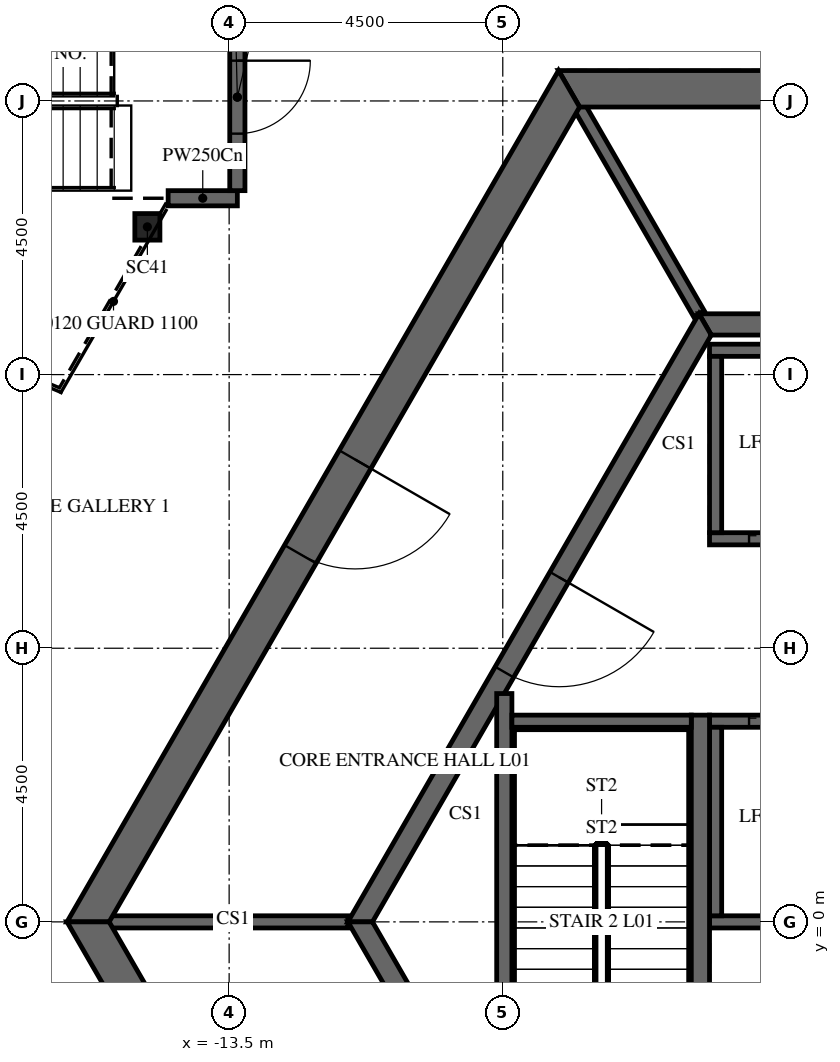
"""IFC4 building model, lengths in metres.
Left out: names, types, materials, properties, quantities, classifications, styles, units other than length and angle.
Written with IfcOpenShell. Run it as: python <this file> out.ifc"""

import sys

from ifc_helpers import new_model, si_unit, direction, frame, frame_2d, origin, origin_2d, place, context, subcontext, project, spatial, polyline, rectangle, i_section, outline, extrude, element, fill, save


model = new_model("IFC4")
c1 = context("Model", 3, precision=1e-05, world=origin(), true_north=direction((0.0, 1.0)))
c2 = subcontext(c1, "Body", "Model", "MODEL_VIEW")
j1 = project(units=[si_unit("LENGTHUNIT", "METRE"), si_unit("PLANEANGLEUNIT", "RADIAN")], contexts=[c1])
p1 = place(None, origin())
s1 = spatial("IfcSite", under=j1, at=p1, CompositionType="ELEMENT")
p2 = place(p1, origin())
s2 = spatial("IfcBuilding", under=s1, at=p2, CompositionType="ELEMENT")
p3 = place(p2, frame((0.0, 0.0, 9.0)))
s3 = spatial("IfcBuildingStorey", under=s2, at=p3, CompositionType="ELEMENT", Elevation=9.0)
p4 = place(p3, frame((-14.845, 11.43, -0.25), z_axis=(0.0, 0.0, 1.0), x_axis=(1.0, 0.0, 0.0)))
e1 = element("IfcColumn", 1, at=p4, inside=s3, PredefinedType="COLUMN", context=c2, shape_type="SweptSolid", body=[
    extrude(i_section(OverallWidth=0.412, OverallDepth=0.437, WebThickness=0.036, FlangeThickness=0.058, FilletRadius=0.015, at=origin_2d()), origin(), (0.0, 0.0, 1.0), 6.0),
])
p5 = place(p3, frame((-7.91, 13.7, -0.25), z_axis=(0.0, 0.0, 1.0), x_axis=(-0.499999880136, -0.866025472988, 0.0)))
e2 = element("IfcWall", 2, at=p5, inside=s3, PredefinedType="SHEAR", context=c2, shape_type="SweptSolid", body=[
    extrude(outline(polyline([(-0.173, -0.3), (15.993, -0.3), (15.646, 0.3), (0.173, 0.3), (-0.173, -0.3)])), origin(), (0.0, 0.0, 1.0), 6.0),
])
p6 = place(p5, frame((7.039, 0.0, 0.25)))
e3 = element("IfcOpeningElement", 3, at=p6, cuts=e2, PredefinedType="OPENING", context=c2, shape_type="SweptSolid", body=[
    extrude(rectangle(XDim=1.8, YDim=2.4, at=frame_2d((0.9, 1.2))), frame((0.0, 0.31, 0.0), z_axis=(0.0, -1.0, 0.0), x_axis=(1.0, 0.0, 0.0)), (0.0, 0.0, 1.0), 0.62),
])
p7 = place(p3, frame((-15.819, 0.0, -0.25), z_axis=(0.0, 0.0, 1.0), x_axis=(0.499999880136, -0.866025472988, 0.0)))
e4 = element("IfcWall", 4, at=p7, inside=s3, PredefinedType="SHEAR", context=c2, shape_type="SweptSolid", body=[
    extrude(outline(polyline([(-0.173, -0.3), (15.993, -0.3), (15.646, 0.3), (0.173, 0.3), (-0.173, -0.3)])), origin(), (0.0, 0.0, 1.0), 6.0),
])
p8 = place(p7, frame((6.981, 0.0, 0.25)))
e5 = element("IfcOpeningElement", 5, at=p8, cuts=e4, PredefinedType="OPENING", context=c2, shape_type="SweptSolid", body=[
    extrude(rectangle(XDim=1.8, YDim=2.4, at=frame_2d((0.9, 1.2))), frame((0.0, 0.31, 0.0), z_axis=(0.0, -1.0, 0.0), x_axis=(1.0, 0.0, 0.0)), (0.0, 0.0, 1.0), 0.62),
])
p9 = place(p3, frame((7.91, 13.7, -0.25), z_axis=(0.0, 0.0, 1.0), x_axis=(-1.0, 0.0, 0.0)))
e6 = element("IfcWall", 6, at=p9, inside=s3, PredefinedType="SHEAR", context=c2, shape_type="SweptSolid", body=[
    extrude(outline(polyline([(-0.173, -0.3), (15.993, -0.3), (15.646, 0.3), (0.173, 0.3), (-0.173, -0.3)])), origin(), (0.0, 0.0, 1.0), 6.0),
])
p10 = place(p9, frame((7.31, 0.0, 0.25)))
e7 = element("IfcOpeningElement", 7, at=p10, cuts=e6, PredefinedType="OPENING", context=c2, shape_type="SweptSolid", body=[
    extrude(rectangle(XDim=1.2, YDim=2.4, at=frame_2d((0.6, 1.2))), frame((0.0, 0.31, 0.0), z_axis=(0.0, -1.0, 0.0), x_axis=(1.0, 0.0, 0.0)), (0.0, 0.0, 1.0), 0.62),
])
p11 = place(p3, frame((-5.673, 9.825, -0.25), z_axis=(0.0, 0.0, 1.0), x_axis=(-0.499995046907, -0.866028263435, 0.0)))
e8 = element("IfcWall", 8, at=p11, inside=s3, PredefinedType="SHEAR", context=c2, shape_type="SweptSolid", body=[
    extrude(outline(polyline([(-0.101, -0.175), (11.446, -0.175), (11.244, 0.175), (0.101, 0.175), (-0.101, -0.175)])), origin(), (0.0, 0.0, 1.0), 6.0),
])
p12 = place(p11, frame((4.801, 0.0, 0.25)))
e9 = element("IfcOpeningElement", 9, at=p12, cuts=e8, PredefinedType="OPENING", context=c2, shape_type="SweptSolid", body=[
    extrude(rectangle(XDim=1.8, YDim=2.4, at=frame_2d((0.9, 1.2))), frame((0.0, 0.185, 0.0), z_axis=(0.0, -1.0, 0.0), x_axis=(1.0, 0.0, 0.0)), (0.0, 0.0, 1.0), 0.37),
])
p13 = place(p3, frame((-11.345, 0.0, -0.25), z_axis=(0.0, 0.0, 1.0), x_axis=(0.499995046907, -0.866028263435, 0.0)))
e10 = element("IfcWall", 10, at=p13, inside=s3, PredefinedType="SHEAR", context=c2, shape_type="SweptSolid", body=[
    extrude(outline(polyline([(-0.101, -0.175), (11.446, -0.175), (11.244, 0.175), (0.101, 0.175), (-0.101, -0.175)])), origin(), (0.0, 0.0, 1.0), 6.0),
])
p14 = place(p13, frame((4.744, 0.0, 0.25)))
e11 = element("IfcOpeningElement", 11, at=p14, cuts=e10, PredefinedType="OPENING", context=c2, shape_type="SweptSolid", body=[
    extrude(rectangle(XDim=1.8, YDim=2.4, at=frame_2d((0.9, 1.2))), frame((0.0, 0.185, 0.0), z_axis=(0.0, -1.0, 0.0), x_axis=(1.0, 0.0, 0.0)), (0.0, 0.0, 1.0), 0.37),
])
p15 = place(p3, frame((5.673, 9.825, -0.25), z_axis=(0.0, 0.0, 1.0), x_axis=(-1.0, 0.0, 0.0)))
e12 = element("IfcWall", 12, at=p15, inside=s3, PredefinedType="SHEAR", context=c2, shape_type="SweptSolid", body=[
    extrude(outline(polyline([(-0.101, -0.175), (11.446, -0.175), (11.244, 0.175), (0.101, 0.175), (-0.101, -0.175)])), origin(), (0.0, 0.0, 1.0), 6.0),
])
p16 = place(p3, frame((-5.6, 6.3, -0.25), z_axis=(0.0, 0.0, 1.0), x_axis=(1.0, 0.0, 0.0)))
e13 = element("IfcWall", 13, at=p16, inside=s3, PredefinedType="SHEAR", context=c2, shape_type="SweptSolid", body=[
    extrude(rectangle(XDim=11.2, YDim=0.2, at=frame_2d((5.6, 0.0))), origin(), (0.0, 0.0, 1.0), 6.0),
])
p17 = place(p16, frame((0.65, 0.0, 0.25)))
e14 = element("IfcOpeningElement", 14, at=p17, cuts=e13, PredefinedType="OPENING", context=c2, shape_type="SweptSolid", body=[
    extrude(rectangle(XDim=1.1, YDim=2.1, at=frame_2d((0.55, 1.05))), frame((0.0, 0.11, 0.0), z_axis=(0.0, -1.0, 0.0), x_axis=(1.0, 0.0, 0.0)), (0.0, 0.0, 1.0), 0.22),
])
p18 = place(p16, frame((2.85, 0.0, 0.25)))
e15 = element("IfcOpeningElement", 15, at=p18, cuts=e13, PredefinedType="OPENING", context=c2, shape_type="SweptSolid", body=[
    extrude(rectangle(XDim=1.1, YDim=2.1, at=frame_2d((0.55, 1.05))), frame((0.0, 0.11, 0.0), z_axis=(0.0, -1.0, 0.0), x_axis=(1.0, 0.0, 0.0)), (0.0, 0.0, 1.0), 0.22),
])
p19 = place(p16, frame((5.05, 0.0, 0.25)))
e16 = element("IfcOpeningElement", 16, at=p19, cuts=e13, PredefinedType="OPENING", context=c2, shape_type="SweptSolid", body=[
    extrude(rectangle(XDim=1.1, YDim=2.1, at=frame_2d((0.55, 1.05))), frame((0.0, 0.11, 0.0), z_axis=(0.0, -1.0, 0.0), x_axis=(1.0, 0.0, 0.0)), (0.0, 0.0, 1.0), 0.22),
])
p20 = place(p16, frame((7.25, 0.0, 0.25)))
e17 = element("IfcOpeningElement", 17, at=p20, cuts=e13, PredefinedType="OPENING", context=c2, shape_type="SweptSolid", body=[
    extrude(rectangle(XDim=1.1, YDim=2.1, at=frame_2d((0.55, 1.05))), frame((0.0, 0.11, 0.0), z_axis=(0.0, -1.0, 0.0), x_axis=(1.0, 0.0, 0.0)), (0.0, 0.0, 1.0), 0.22),
])
p21 = place(p16, frame((9.45, 0.0, 0.25)))
e18 = element("IfcOpeningElement", 18, at=p21, cuts=e13, PredefinedType="OPENING", context=c2, shape_type="SweptSolid", body=[
    extrude(rectangle(XDim=1.1, YDim=2.1, at=frame_2d((0.55, 1.05))), frame((0.0, 0.11, 0.0), z_axis=(0.0, -1.0, 0.0), x_axis=(1.0, 0.0, 0.0)), (0.0, 0.0, 1.0), 0.22),
])
p22 = place(p3, frame((-5.6, 9.4, -0.25), z_axis=(0.0, 0.0, 1.0), x_axis=(1.0, 0.0, 0.0)))
e19 = element("IfcWall", 19, at=p22, inside=s3, PredefinedType="SHEAR", context=c2, shape_type="SweptSolid", body=[
    extrude(rectangle(XDim=11.2, YDim=0.2, at=frame_2d((5.6, 0.0))), origin(), (0.0, 0.0, 1.0), 6.0),
])
p23 = place(p3, frame((-5.5, 6.4, -0.25), z_axis=(0.0, 0.0, 1.0), x_axis=(0.0, 1.0, 0.0)))
e20 = element("IfcWall", 20, at=p23, inside=s3, PredefinedType="SHEAR", context=c2, shape_type="SweptSolid", body=[
    extrude(rectangle(XDim=2.9, YDim=0.2, at=frame_2d((1.45, 0.0))), origin(), (0.0, 0.0, 1.0), 6.0),
])
p24 = place(p3, frame((-5.6, 3.3, -0.25), z_axis=(0.0, 0.0, 1.0), x_axis=(1.0, 0.0, 0.0)))
e21 = element("IfcWall", 21, at=p24, inside=s3, PredefinedType="SHEAR", context=c2, shape_type="SweptSolid", body=[
    extrude(rectangle(XDim=11.2, YDim=0.2, at=frame_2d((5.6, 0.0))), origin(), (0.0, 0.0, 1.0), 6.0),
])
p25 = place(p24, frame((0.65, 0.0, 0.25)))
e22 = element("IfcOpeningElement", 22, at=p25, cuts=e21, PredefinedType="OPENING", context=c2, shape_type="SweptSolid", body=[
    extrude(rectangle(XDim=1.1, YDim=2.1, at=frame_2d((0.55, 1.05))), frame((0.0, 0.11, 0.0), z_axis=(0.0, -1.0, 0.0), x_axis=(1.0, 0.0, 0.0)), (0.0, 0.0, 1.0), 0.22),
])
p26 = place(p24, frame((2.85, 0.0, 0.25)))
e23 = element("IfcOpeningElement", 23, at=p26, cuts=e21, PredefinedType="OPENING", context=c2, shape_type="SweptSolid", body=[
    extrude(rectangle(XDim=1.1, YDim=2.1, at=frame_2d((0.55, 1.05))), frame((0.0, 0.11, 0.0), z_axis=(0.0, -1.0, 0.0), x_axis=(1.0, 0.0, 0.0)), (0.0, 0.0, 1.0), 0.22),
])
p27 = place(p24, frame((5.05, 0.0, 0.25)))
e24 = element("IfcOpeningElement", 24, at=p27, cuts=e21, PredefinedType="OPENING", context=c2, shape_type="SweptSolid", body=[
    extrude(rectangle(XDim=1.1, YDim=2.1, at=frame_2d((0.55, 1.05))), frame((0.0, 0.11, 0.0), z_axis=(0.0, -1.0, 0.0), x_axis=(1.0, 0.0, 0.0)), (0.0, 0.0, 1.0), 0.22),
])
p28 = place(p24, frame((7.25, 0.0, 0.25)))
e25 = element("IfcOpeningElement", 25, at=p28, cuts=e21, PredefinedType="OPENING", context=c2, shape_type="SweptSolid", body=[
    extrude(rectangle(XDim=1.1, YDim=2.1, at=frame_2d((0.55, 1.05))), frame((0.0, 0.11, 0.0), z_axis=(0.0, -1.0, 0.0), x_axis=(1.0, 0.0, 0.0)), (0.0, 0.0, 1.0), 0.22),
])
p29 = place(p24, frame((9.45, 0.0, 0.25)))
e26 = element("IfcOpeningElement", 26, at=p29, cuts=e21, PredefinedType="OPENING", context=c2, shape_type="SweptSolid", body=[
    extrude(rectangle(XDim=1.1, YDim=2.1, at=frame_2d((0.55, 1.05))), frame((0.0, 0.11, 0.0), z_axis=(0.0, -1.0, 0.0), x_axis=(1.0, 0.0, 0.0)), (0.0, 0.0, 1.0), 0.22),
])
p30 = place(p3, frame((-5.6, 0.0, -0.25), z_axis=(0.0, 0.0, 1.0), x_axis=(1.0, 0.0, 0.0)))
e27 = element("IfcWall", 27, at=p30, inside=s3, PredefinedType="SHEAR", context=c2, shape_type="SweptSolid", body=[
    extrude(rectangle(XDim=11.2, YDim=0.2, at=frame_2d((5.6, 0.0))), origin(), (0.0, 0.0, 1.0), 6.0),
])
p31 = place(p3, frame((-5.5, 0.1, -0.25), z_axis=(0.0, 0.0, 1.0), x_axis=(0.0, 1.0, 0.0)))
e28 = element("IfcWall", 28, at=p31, inside=s3, PredefinedType="SHEAR", context=c2, shape_type="SweptSolid", body=[
    extrude(rectangle(XDim=3.1, YDim=0.2, at=frame_2d((1.55, 0.0))), origin(), (0.0, 0.0, 1.0), 6.0),
])
p32 = place(p3, frame((-5.773, 10.0, -0.25), z_axis=(0.0, 0.0, 1.0), x_axis=(-0.500038251005, 0.86600331843, 0.0)))
e29 = element("IfcWall", 29, at=p32, inside=s3, PredefinedType="SHEAR", context=c2, shape_type="SweptSolid", body=[
    extrude(rectangle(XDim=3.926, YDim=0.2, at=frame_2d((1.963, 0.0))), origin(), (0.0, 0.0, 1.0), 6.0),
])
p33 = place(p3, frame((-11.547, 0.0, -0.25), z_axis=(0.0, 0.0, 1.0), x_axis=(-1.0, 0.0, 0.0)))
e30 = element("IfcWall", 30, at=p33, inside=s3, PredefinedType="SHEAR", context=c2, shape_type="SweptSolid", body=[
    extrude(rectangle(XDim=3.926, YDim=0.2, at=frame_2d((1.963, 0.0))), origin(), (0.0, 0.0, 1.0), 6.0),
])
p34 = place(p3, frame((-5.75, -3.4, -0.25), z_axis=(0.0, 0.0, 1.0), x_axis=(0.0, 1.0, 0.0)))
e31 = element("IfcWall", 31, at=p34, inside=s3, PredefinedType="SHEAR", context=c2, shape_type="SweptSolid", body=[
    extrude(rectangle(XDim=6.8, YDim=0.3, at=frame_2d((3.4, 0.0))), origin(), (0.0, 0.0, 1.0), 6.0),
])
p35 = place(p3, frame((-8.975, -3.755, -0.25), z_axis=(0.0, 0.0, 1.0), x_axis=(0.0, 1.0, 0.0)))
e32 = element("IfcWall", 32, at=p35, inside=s3, PredefinedType="SHEAR", context=c2, shape_type="SweptSolid", body=[
    extrude(rectangle(XDim=7.51, YDim=0.25, at=frame_2d((3.755, 0.0))), origin(), (0.0, 0.0, 1.0), 6.0),
])
p36 = place(p3, frame((-8.85, 3.3, -0.25), z_axis=(0.0, 0.0, 1.0), x_axis=(1.0, 0.0, 0.0)))
e33 = element("IfcWall", 33, at=p36, inside=s3, PredefinedType="SHEAR", context=c2, shape_type="SweptSolid", body=[
    extrude(rectangle(XDim=2.95, YDim=0.2, at=frame_2d((1.475, 0.0))), origin(), (0.0, 0.0, 1.0), 6.0),
])
p37 = place(p3, frame((-13.365, 11.9, 0.0), z_axis=(0.0, 0.0, 1.0), x_axis=(-1.0, 0.0, 0.0)))
e34 = element("IfcWall", 34, at=p37, inside=s3, PredefinedType="PARTITIONING", context=c2, shape_type="SweptSolid", body=[
    extrude(rectangle(XDim=1.138, YDim=0.25, at=frame_2d((0.569, 0.0))), origin(), (0.0, 0.0, 1.0), 5.297),
])
p38 = place(p3, frame((-13.365, 15.1, 0.0), z_axis=(0.0, 0.0, 1.0), x_axis=(0.0, -1.0, 0.0)))
e35 = element("IfcWall", 35, at=p38, inside=s3, PredefinedType="PARTITIONING", context=c2, shape_type="SweptSolid", body=[
    extrude(rectangle(XDim=3.075, YDim=0.25, at=frame_2d((1.538, 0.0))), origin(), (0.0, 0.0, 1.0), 4.988),
])
p39 = place(p38, frame((0.938, 0.0, 0.0)))
e36 = element("IfcOpeningElement", 36, at=p39, cuts=e35, PredefinedType="OPENING", context=c2, shape_type="SweptSolid", body=[
    extrude(rectangle(XDim=1.2, YDim=2.1, at=frame_2d((0.6, 1.05))), frame((0.0, 0.135, 0.0), z_axis=(0.0, -1.0, 0.0), x_axis=(1.0, 0.0, 0.0)), (0.0, 0.0, 1.0), 0.27),
])
p40 = place(p6, origin())
e37 = element("IfcDoor", 37, at=p40, inside=s3, OperationType="DOUBLE_DOOR_SINGLE_SWING", PredefinedType="DOOR", context=c2, shape_type="SweptSolid", body=[
    extrude(rectangle(XDim=1.8, YDim=2.4, at=frame_2d((0.9, 1.2))), frame((0.0, 0.025, 0.0), z_axis=(0.0, -1.0, 0.0), x_axis=(1.0, 0.0, 0.0)), (0.0, 0.0, 1.0), 0.05),
])
fill(e3, e37)
p41 = place(p12, origin())
e38 = element("IfcDoor", 38, at=p41, inside=s3, OperationType="DOUBLE_DOOR_SINGLE_SWING", PredefinedType="DOOR", context=c2, shape_type="SweptSolid", body=[
    extrude(rectangle(XDim=1.8, YDim=2.4, at=frame_2d((0.9, 1.2))), frame((0.0, 0.025, 0.0), z_axis=(0.0, -1.0, 0.0), x_axis=(1.0, 0.0, 0.0)), (0.0, 0.0, 1.0), 0.05),
])
fill(e9, e38)
p42 = place(p17, origin())
e39 = element("IfcDoor", 39, at=p42, inside=s3, OperationType="SLIDING_TO_LEFT", PredefinedType="DOOR", context=c2, shape_type="SweptSolid", body=[
    extrude(rectangle(XDim=1.1, YDim=2.1, at=frame_2d((0.55, 1.05))), frame((0.0, 0.025, 0.0), z_axis=(0.0, -1.0, 0.0), x_axis=(1.0, 0.0, 0.0)), (0.0, 0.0, 1.0), 0.05),
])
fill(e14, e39)
p43 = place(p25, origin())
e40 = element("IfcDoor", 40, at=p43, inside=s3, OperationType="SLIDING_TO_LEFT", PredefinedType="DOOR", context=c2, shape_type="SweptSolid", body=[
    extrude(rectangle(XDim=1.1, YDim=2.1, at=frame_2d((0.55, 1.05))), frame((0.0, 0.025, 0.0), z_axis=(0.0, -1.0, 0.0), x_axis=(1.0, 0.0, 0.0)), (0.0, 0.0, 1.0), 0.05),
])
fill(e22, e40)
p44 = place(p39, origin())
e41 = element("IfcDoor", 41, at=p44, inside=s3, OperationType="SINGLE_SWING_RIGHT", PredefinedType="DOOR", context=c2, shape_type="SweptSolid", body=[
    extrude(rectangle(XDim=1.2, YDim=2.1, at=frame_2d((0.6, 1.05))), frame((0.0, 0.025, 0.0), z_axis=(0.0, -1.0, 0.0), x_axis=(1.0, 0.0, 0.0)), (0.0, 0.0, 1.0), 0.05),
])
fill(e36, e41)
save(model, sys.argv[1])
